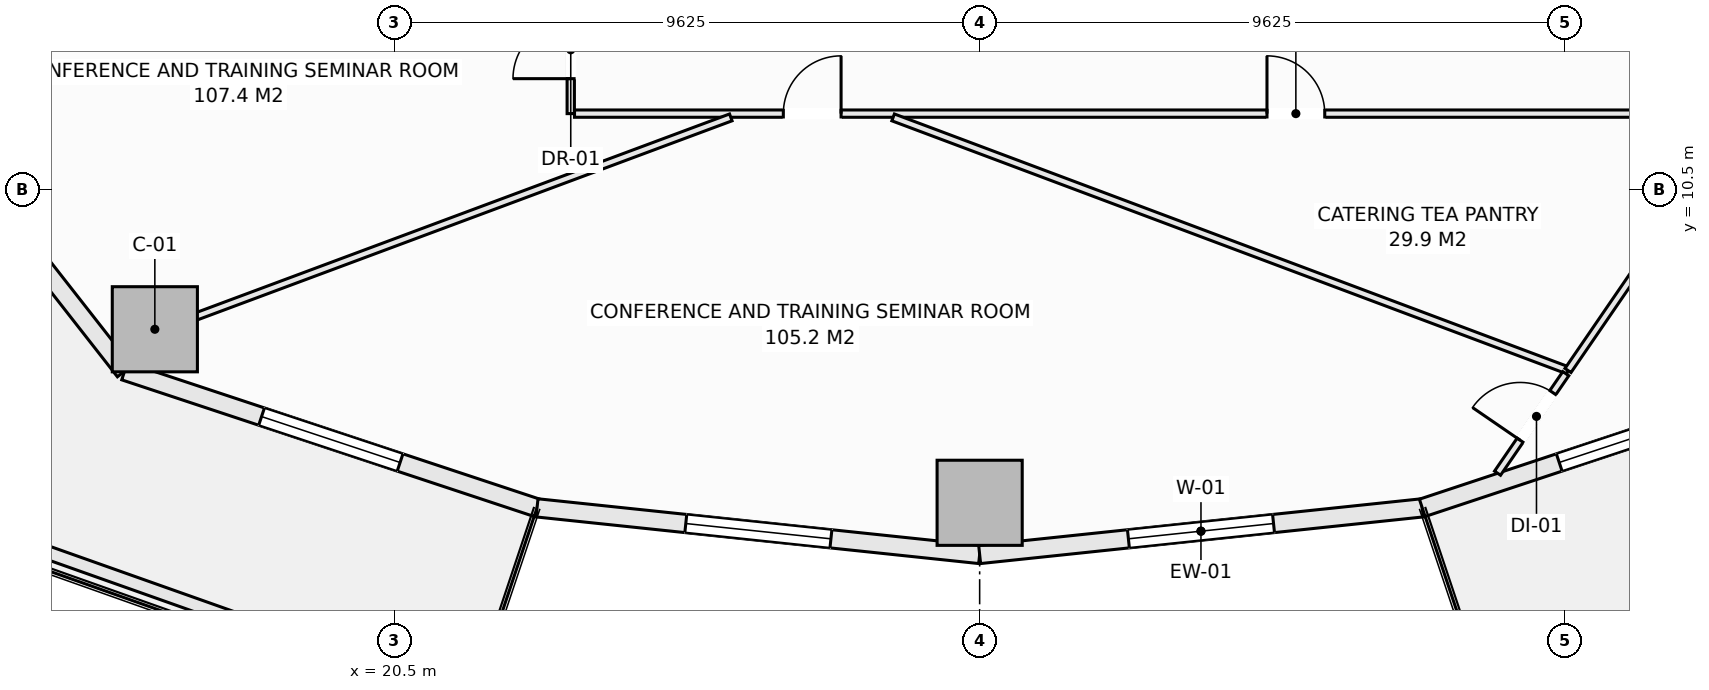
"""IFC4 building model, lengths in metres.
Left out: names, types, materials, properties, quantities, classifications, styles, units other than length and angle.
Written with IfcOpenShell. Run it as: python <this file> out.ifc"""

import sys

from ifc_helpers import new_model, si_unit, direction, frame, frame_2d, origin, origin_2d, place, context, subcontext, project, spatial, rectangle, extrude, element, fill, save


model = new_model("IFC4")
c1 = context("Model", 3, precision=1e-05, world=origin(), true_north=direction((0.0, 1.0)))
c2 = subcontext(c1, "Body", "Model", "MODEL_VIEW")
j1 = project(units=[si_unit("LENGTHUNIT", "METRE"), si_unit("PLANEANGLEUNIT", "RADIAN")], contexts=[c1])
p1 = place(None, origin())
s1 = spatial("IfcSite", under=j1, at=p1, CompositionType="ELEMENT")
p2 = place(p1, origin())
s2 = spatial("IfcBuilding", under=s1, at=p2, CompositionType="ELEMENT")
p3 = place(p2, frame((0.0, 0.0, 34.2)))
s3 = spatial("IfcBuildingStorey", under=s2, at=p3, CompositionType="ELEMENT", Elevation=34.2)
for number, where, z_axis, x_axis in (
    (1, (16.56, 8.204, -0.28), (0.0, 0.0, 1.0), (1.0, 0.0, 0.0)),
    (2, (30.125, 5.35, -0.28), (0.0, 0.0, 1.0), (1.0, 0.0, 0.0)),
):
    element("IfcColumn", number, at=place(p3, frame(where, z_axis=z_axis, x_axis=x_axis)), inside=s3, PredefinedType="COLUMN", context=c2, shape_type="SweptSolid", body=[
        extrude(rectangle(XDim=1.4, YDim=1.4, at=origin_2d()), origin(), (0.0, 0.0, 1.0), 3.85),
    ])
p4 = place(p3, frame((11.935, 12.787, 0.0), z_axis=(0.0, 0.0, 1.0), x_axis=(0.616421309777, -0.787416515482, 0.0)))
e3 = element("IfcWall", 3, at=p4, inside=s3, PredefinedType="SOLIDWALL", context=c2, shape_type="SweptSolid", body=[
    extrude(rectangle(XDim=6.696, YDim=0.3, at=frame_2d((3.348, 0.0))), origin(), (0.0, 0.0, 1.0), 3.093),
])
p5 = place(p4, frame((2.448, 0.0, 0.0)))
e4 = element("IfcOpeningElement", 4, at=p5, cuts=e3, PredefinedType="OPENING", context=c2, shape_type="SweptSolid", body=[
    extrude(rectangle(XDim=1.8, YDim=2.25, at=frame_2d((0.9, 1.125))), frame((0.0, 0.16, 0.0), z_axis=(0.0, -1.0, 0.0), x_axis=(1.0, 0.0, 0.0)), (0.0, 0.0, 1.0), 0.32),
])
p6 = place(p3, frame((16.062, 7.514, 0.0), z_axis=(0.0, 0.0, 1.0), x_axis=(0.949238715533, -0.31455661006, 0.0)))
e5 = element("IfcWall", 5, at=p6, inside=s3, PredefinedType="SOLIDWALL", context=c2, shape_type="SweptSolid", body=[
    extrude(rectangle(XDim=7.146, YDim=0.3, at=frame_2d((3.573, 0.0))), origin(), (0.0, 0.0, 1.0), 3.093),
])
p7 = place(p6, frame((2.373, 0.0, 0.85)))
e6 = element("IfcOpeningElement", 6, at=p7, cuts=e5, PredefinedType="OPENING", context=c2, shape_type="SweptSolid", body=[
    extrude(rectangle(XDim=2.4, YDim=1.9, at=frame_2d((1.2, 0.95))), frame((0.0, 0.16, 0.0), z_axis=(0.0, -1.0, 0.0), x_axis=(1.0, 0.0, 0.0)), (0.0, 0.0, 1.0), 0.32),
])
p8 = place(p3, frame((22.846, 5.267, 0.0), z_axis=(0.0, 0.0, 1.0), x_axis=(0.994500334317, -0.104733399844, 0.0)))
e7 = element("IfcWall", 7, at=p8, inside=s3, PredefinedType="SOLIDWALL", context=c2, shape_type="SweptSolid", body=[
    extrude(rectangle(XDim=7.32, YDim=0.3, at=frame_2d((3.66, 0.0))), origin(), (0.0, 0.0, 1.0), 3.093),
])
p9 = place(p8, frame((2.46, 0.0, 0.85)))
e8 = element("IfcOpeningElement", 8, at=p9, cuts=e7, PredefinedType="OPENING", context=c2, shape_type="SweptSolid", body=[
    extrude(rectangle(XDim=2.4, YDim=1.9, at=frame_2d((1.2, 0.95))), frame((0.0, 0.16, 0.0), z_axis=(0.0, -1.0, 0.0), x_axis=(1.0, 0.0, 0.0)), (0.0, 0.0, 1.0), 0.32),
])
p10 = place(p3, frame((30.125, 4.5, 0.0), z_axis=(0.0, 0.0, 1.0), x_axis=(0.994500334317, 0.104733399844, 0.0)))
e9 = element("IfcWall", 9, at=p10, inside=s3, PredefinedType="SOLIDWALL", context=c2, shape_type="SweptSolid", body=[
    extrude(rectangle(XDim=7.32, YDim=0.3, at=frame_2d((3.66, 0.0))), origin(), (0.0, 0.0, 1.0), 3.093),
])
p11 = place(p10, frame((2.46, 0.0, 0.85)))
e10 = element("IfcOpeningElement", 10, at=p11, cuts=e9, PredefinedType="OPENING", context=c2, shape_type="SweptSolid", body=[
    extrude(rectangle(XDim=2.4, YDim=1.9, at=frame_2d((1.2, 0.95))), frame((0.0, 0.16, 0.0), z_axis=(0.0, -1.0, 0.0), x_axis=(1.0, 0.0, 0.0)), (0.0, 0.0, 1.0), 0.32),
])
p12 = place(p3, frame((37.404, 5.267, 0.0), z_axis=(0.0, 0.0, 1.0), x_axis=(0.949238715533, 0.31455661006, 0.0)))
e11 = element("IfcWall", 11, at=p12, inside=s3, PredefinedType="SOLIDWALL", context=c2, shape_type="SweptSolid", body=[
    extrude(rectangle(XDim=7.146, YDim=0.3, at=frame_2d((3.573, 0.0))), origin(), (0.0, 0.0, 1.0), 3.093),
])
p13 = place(p12, frame((2.373, 0.0, 0.85)))
e12 = element("IfcOpeningElement", 12, at=p13, cuts=e11, PredefinedType="OPENING", context=c2, shape_type="SweptSolid", body=[
    extrude(rectangle(XDim=2.4, YDim=1.9, at=frame_2d((1.2, 0.95))), frame((0.0, 0.16, 0.0), z_axis=(0.0, -1.0, 0.0), x_axis=(1.0, 0.0, 0.0)), (0.0, 0.0, 1.0), 0.32),
])
for number, where, z_axis, x_axis in (
    (13, (14.049, 4.795, 0.0), (0.0, 0.0, 1.0), (0.943, -0.334, 0.0)),
    (14, (38.438, 2.045, 0.0), (0.0, 0.0, 1.0), (0.943, 0.334, 0.0)),
):
    element("IfcWall", number, at=place(p3, frame(where, z_axis=z_axis, x_axis=x_axis)), inside=s3, PredefinedType="PARAPET", context=c2, shape_type="SweptSolid", body=[
        extrude(rectangle(XDim=8.236, YDim=0.22, at=frame_2d((4.118, 0.0))), origin(), (0.0, 0.0, 1.0), 0.52),
    ])
p14 = place(p3, frame((23.4, 11.75, 0.0), z_axis=(0.0, 0.0, 1.0), x_axis=(0.0, 1.0, 0.0)))
e15 = element("IfcWall", 15, at=p14, inside=s3, PredefinedType="PARTITIONING", context=c2, shape_type="SweptSolid", body=[
    extrude(rectangle(XDim=2.1, YDim=0.12, at=frame_2d((1.05, 0.0))), origin(), (0.0, 0.0, 1.0), 3.57),
])
p15 = place(p14, frame((0.575, 0.0, 0.0)))
e16 = element("IfcOpeningElement", 16, at=p15, cuts=e15, PredefinedType="OPENING", context=c2, shape_type="SweptSolid", body=[
    extrude(rectangle(XDim=0.95, YDim=2.1, at=frame_2d((0.475, 1.05))), frame((0.0, 0.07, 0.0), z_axis=(0.0, -1.0, 0.0), x_axis=(1.0, 0.0, 0.0)), (0.0, 0.0, 1.0), 0.14),
])
p16 = place(p3, frame((23.462, 11.75, 0.0), z_axis=(0.0, 0.0, 1.0), x_axis=(1.0, 0.0, 0.0)))
e17 = element("IfcWall", 17, at=p16, inside=s3, PredefinedType="PARTITIONING", context=c2, shape_type="SweptSolid", body=[
    extrude(rectangle(XDim=19.495, YDim=0.12, at=frame_2d((9.748, 0.0))), origin(), (0.0, 0.0, 1.0), 3.57),
])
p17 = place(p16, frame((3.434, 0.0, 0.0)))
e18 = element("IfcOpeningElement", 18, at=p17, cuts=e17, PredefinedType="OPENING", context=c2, shape_type="SweptSolid", body=[
    extrude(rectangle(XDim=0.95, YDim=2.1, at=frame_2d((0.475, 1.05))), frame((0.0, 0.07, 0.0), z_axis=(0.0, -1.0, 0.0), x_axis=(1.0, 0.0, 0.0)), (0.0, 0.0, 1.0), 0.14),
])
p18 = place(p16, frame((11.388, 0.0, 0.0)))
e19 = element("IfcOpeningElement", 19, at=p18, cuts=e17, PredefinedType="OPENING", context=c2, shape_type="SweptSolid", body=[
    extrude(rectangle(XDim=0.95, YDim=2.1, at=frame_2d((0.475, 1.05))), frame((0.0, 0.07, 0.0), z_axis=(0.0, -1.0, 0.0), x_axis=(1.0, 0.0, 0.0)), (0.0, 0.0, 1.0), 0.14),
])
p19 = place(p3, frame((28.702, 11.688, 0.0), z_axis=(0.0, 0.0, 1.0), x_axis=(0.936344412232, -0.351082813139, 0.0)))
e20 = element("IfcWall", 20, at=p19, inside=s3, PredefinedType="PARTITIONING", context=c2, shape_type="SweptSolid", body=[
    extrude(rectangle(XDim=11.854, YDim=0.12, at=frame_2d((5.927, 0.0))), origin(), (0.0, 0.0, 1.0), 3.093),
])
p20 = place(p3, frame((15.932, 7.927, 0.0), z_axis=(0.0, 0.0, 1.0), x_axis=(0.937141242974, 0.348950269689, 0.0)))
e21 = element("IfcWall", 21, at=p20, inside=s3, PredefinedType="PARTITIONING", context=c2, shape_type="SweptSolid", body=[
    extrude(rectangle(XDim=10.777, YDim=0.12, at=frame_2d((5.389, 0.0))), origin(), (0.0, 0.0, 1.0), 2.934),
])
p21 = place(p3, frame((38.642, 5.837, 0.0), z_axis=(0.0, 0.0, 1.0), x_axis=(0.565776914944, 0.82455835604, 0.0)))
e22 = element("IfcWall", 22, at=p21, inside=s3, PredefinedType="PARTITIONING", context=c2, shape_type="SweptSolid", body=[
    extrude(rectangle(XDim=1.985, YDim=0.12, at=frame_2d((0.992, 0.0))), origin(), (0.0, 0.0, 1.0), 3.57),
])
p22 = place(p21, frame((0.657, 0.0, 0.0)))
e23 = element("IfcOpeningElement", 23, at=p22, cuts=e22, PredefinedType="OPENING", context=c2, shape_type="SweptSolid", body=[
    extrude(rectangle(XDim=0.95, YDim=2.1, at=frame_2d((0.475, 1.05))), frame((0.0, 0.07, 0.0), z_axis=(0.0, -1.0, 0.0), x_axis=(1.0, 0.0, 0.0)), (0.0, 0.0, 1.0), 0.14),
])
p23 = place(p3, frame((39.801, 7.526, 0.0), z_axis=(0.0, 0.0, 1.0), x_axis=(0.565756744253, 0.824572195949, 0.0)))
e24 = element("IfcWall", 24, at=p23, inside=s3, PredefinedType="PARTITIONING", context=c2, shape_type="SweptSolid", body=[
    extrude(rectangle(XDim=5.048, YDim=0.12, at=frame_2d((2.524, 0.0))), origin(), (0.0, 0.0, 1.0), 3.57),
])
p24 = place(p7, origin())
e25 = element("IfcWindow", 25, at=p24, inside=s3, PartitioningType="SINGLE_PANEL", PredefinedType="WINDOW", context=c2, shape_type="SweptSolid", body=[
    extrude(rectangle(XDim=2.4, YDim=1.9, at=frame_2d((1.2, 0.95))), frame((0.0, 0.03, 0.0), z_axis=(0.0, -1.0, 0.0), x_axis=(1.0, 0.0, 0.0)), (0.0, 0.0, 1.0), 0.06),
])
fill(e6, e25)
p25 = place(p9, origin())
e26 = element("IfcWindow", 26, at=p25, inside=s3, PartitioningType="SINGLE_PANEL", PredefinedType="WINDOW", context=c2, shape_type="SweptSolid", body=[
    extrude(rectangle(XDim=2.4, YDim=1.9, at=frame_2d((1.2, 0.95))), frame((0.0, 0.03, 0.0), z_axis=(0.0, -1.0, 0.0), x_axis=(1.0, 0.0, 0.0)), (0.0, 0.0, 1.0), 0.06),
])
fill(e8, e26)
p26 = place(p11, origin())
e27 = element("IfcWindow", 27, at=p26, inside=s3, PartitioningType="SINGLE_PANEL", PredefinedType="WINDOW", context=c2, shape_type="SweptSolid", body=[
    extrude(rectangle(XDim=2.4, YDim=1.9, at=frame_2d((1.2, 0.95))), frame((0.0, 0.03, 0.0), z_axis=(0.0, -1.0, 0.0), x_axis=(1.0, 0.0, 0.0)), (0.0, 0.0, 1.0), 0.06),
])
fill(e10, e27)
p27 = place(p13, origin())
e28 = element("IfcWindow", 28, at=p27, inside=s3, PartitioningType="SINGLE_PANEL", PredefinedType="WINDOW", context=c2, shape_type="SweptSolid", body=[
    extrude(rectangle(XDim=2.4, YDim=1.9, at=frame_2d((1.2, 0.95))), frame((0.0, 0.03, 0.0), z_axis=(0.0, -1.0, 0.0), x_axis=(1.0, 0.0, 0.0)), (0.0, 0.0, 1.0), 0.06),
])
fill(e12, e28)
p28 = place(p15, origin())
e29 = element("IfcDoor", 29, at=p28, inside=s3, OperationType="SINGLE_SWING_LEFT", PredefinedType="DOOR", context=c2, shape_type="SweptSolid", body=[
    extrude(rectangle(XDim=0.95, YDim=2.1, at=frame_2d((0.475, 1.05))), frame((0.0, 0.025, 0.0), z_axis=(0.0, -1.0, 0.0), x_axis=(1.0, 0.0, 0.0)), (0.0, 0.0, 1.0), 0.05),
])
fill(e16, e29)
p29 = place(p17, origin())
e30 = element("IfcDoor", 30, at=p29, inside=s3, OperationType="SINGLE_SWING_RIGHT", PredefinedType="DOOR", context=c2, shape_type="SweptSolid", body=[
    extrude(rectangle(XDim=0.95, YDim=2.1, at=frame_2d((0.475, 1.05))), frame((0.0, 0.025, 0.0), z_axis=(0.0, -1.0, 0.0), x_axis=(1.0, 0.0, 0.0)), (0.0, 0.0, 1.0), 0.05),
])
fill(e18, e30)
p30 = place(p18, origin())
e31 = element("IfcDoor", 31, at=p30, inside=s3, OperationType="SINGLE_SWING_LEFT", PredefinedType="DOOR", context=c2, shape_type="SweptSolid", body=[
    extrude(rectangle(XDim=0.95, YDim=2.1, at=frame_2d((0.475, 1.05))), frame((0.0, 0.025, 0.0), z_axis=(0.0, -1.0, 0.0), x_axis=(1.0, 0.0, 0.0)), (0.0, 0.0, 1.0), 0.05),
])
fill(e19, e31)
p31 = place(p22, origin())
e32 = element("IfcDoor", 32, at=p31, inside=s3, OperationType="SINGLE_SWING_LEFT", PredefinedType="DOOR", context=c2, shape_type="SweptSolid", body=[
    extrude(rectangle(XDim=0.95, YDim=2.1, at=frame_2d((0.475, 1.05))), frame((0.0, 0.025, 0.0), z_axis=(0.0, -1.0, 0.0), x_axis=(1.0, 0.0, 0.0)), (0.0, 0.0, 1.0), 0.05),
])
fill(e23, e32)
save(model, sys.argv[1])
